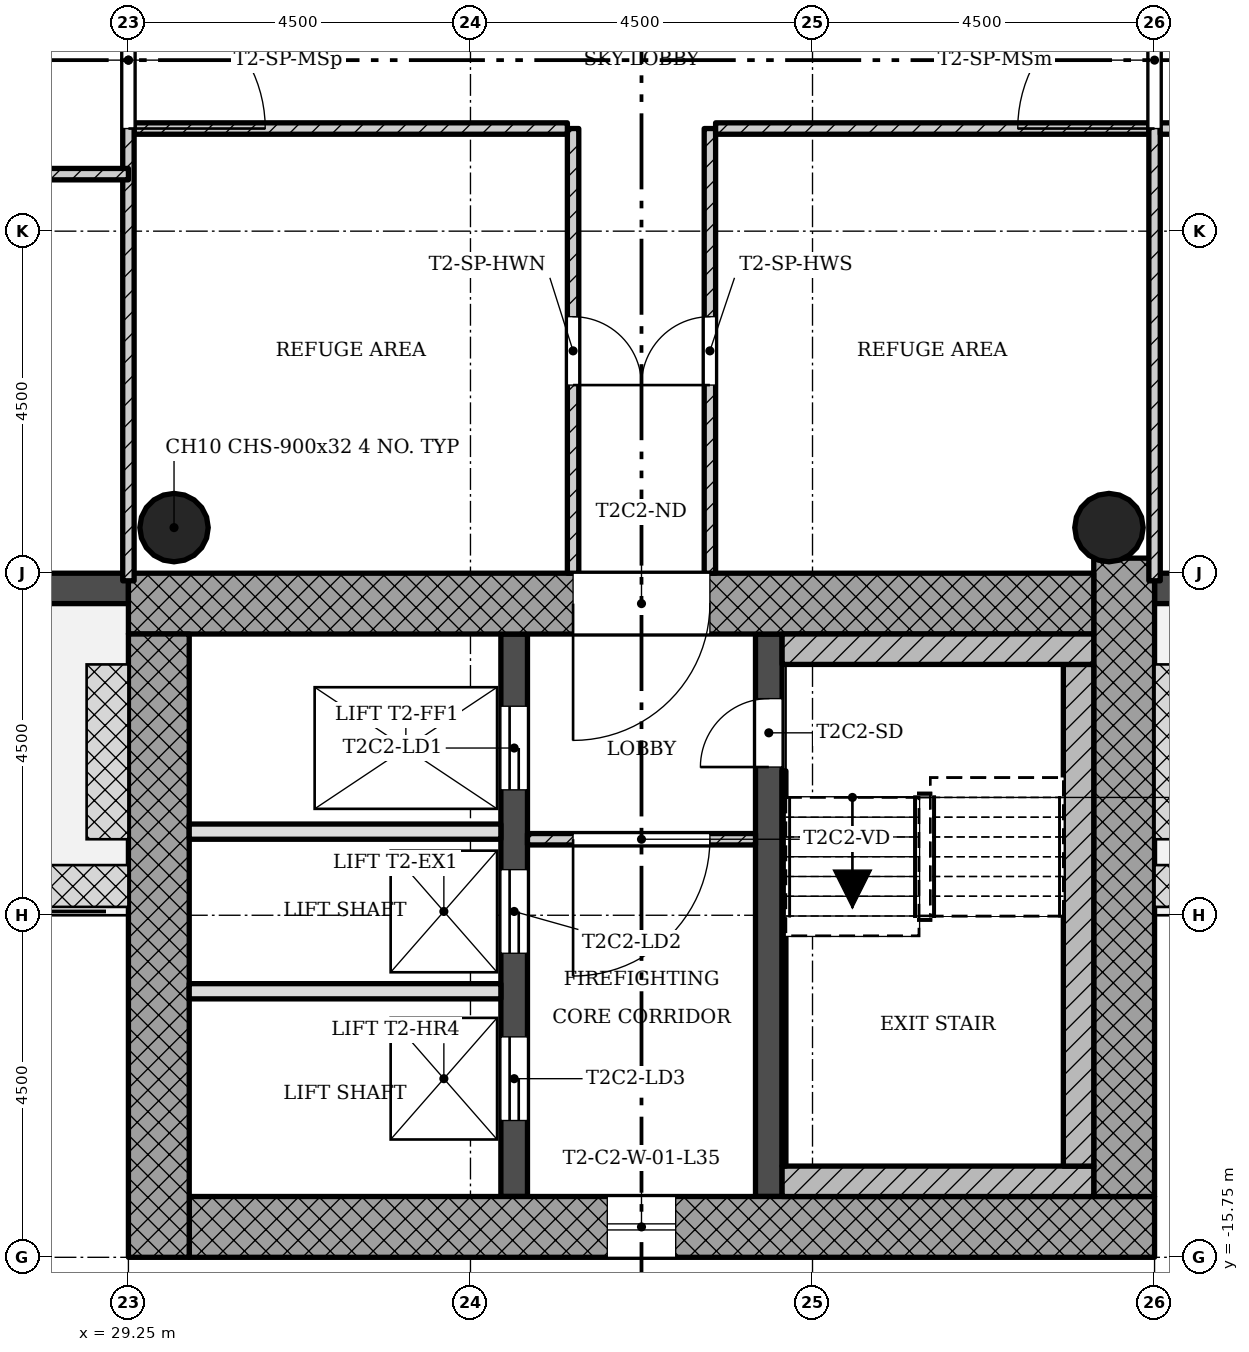
"""IFC4 building model, lengths in metres.
Left out: names, types, materials, properties, quantities, classifications, styles, units other than length and angle.
Written with IfcOpenShell. Run it as: python <this file> out.ifc"""

import sys

from ifc_helpers import new_model, si_unit, direction, frame, frame_2d, origin, origin_2d, place, context, subcontext, project, spatial, rectangle, hollow_circle, extrude, element, fill, save


model = new_model("IFC4")
c1 = context("Model", 3, precision=1e-05, world=origin(), true_north=direction((0.0, 1.0)))
c2 = subcontext(c1, "Body", "Model", "MODEL_VIEW")
j1 = project(units=[si_unit("LENGTHUNIT", "METRE"), si_unit("PLANEANGLEUNIT", "RADIAN")], contexts=[c1])
p1 = place(None, origin())
s1 = spatial("IfcSite", under=j1, at=p1, CompositionType="ELEMENT")
p2 = place(p1, origin())
s2 = spatial("IfcBuilding", under=s1, at=p2, CompositionType="ELEMENT")
p3 = place(p2, frame((0.0, 0.0, 128.7)))
s3 = spatial("IfcBuildingStorey", under=s2, at=p3, CompositionType="ELEMENT", Elevation=128.7)
p4 = place(p3, frame((30.05, -15.35, 0.0), z_axis=(0.0, 0.0, 1.0), x_axis=(1.0, 0.0, 0.0)))
e1 = element("IfcWall", 1, at=p4, inside=s3, PredefinedType="SHEAR", context=c2, shape_type="SweptSolid", body=[
    extrude(rectangle(XDim=12.7, YDim=0.8, at=frame_2d((6.35, 0.0))), origin(), (0.0, 0.0, 1.0), 5.0),
])
p5 = place(p4, frame((5.5, 0.0, 0.45)))
e2 = element("IfcOpeningElement", 2, at=p5, cuts=e1, PredefinedType="OPENING", context=c2, shape_type="SweptSolid", body=[
    extrude(rectangle(XDim=0.9, YDim=2.4, at=frame_2d((0.45, 1.2))), frame((0.0, 0.41, 0.0), z_axis=(0.0, -1.0, 0.0), x_axis=(1.0, 0.0, 0.0)), (0.0, 0.0, 1.0), 0.82),
])
p6 = place(p3, frame((42.35, -14.95, 0.0), z_axis=(0.0, 0.0, 1.0), x_axis=(0.0, 1.0, 0.0)))
e3 = element("IfcWall", 3, at=p6, inside=s3, PredefinedType="SHEAR", context=c2, shape_type="SweptSolid", body=[
    extrude(rectangle(XDim=8.398, YDim=0.8, at=frame_2d((4.199, 0.0))), origin(), (0.0, 0.0, 1.0), 5.0),
])
p7 = place(p3, frame((41.95, -7.15, 0.0), z_axis=(0.0, 0.0, 1.0), x_axis=(-1.0, 0.0, 0.0)))
e4 = element("IfcWall", 4, at=p7, inside=s3, PredefinedType="SHEAR", context=c2, shape_type="SweptSolid", body=[
    extrude(rectangle(XDim=12.7, YDim=0.8, at=frame_2d((6.35, 0.0))), origin(), (0.0, 0.0, 1.0), 5.0),
])
p8 = place(p7, frame((5.05, 0.0, 0.0)))
e5 = element("IfcOpeningElement", 5, at=p8, cuts=e4, PredefinedType="OPENING", context=c2, shape_type="SweptSolid", body=[
    extrude(rectangle(XDim=1.8, YDim=2.1, at=frame_2d((0.9, 1.05))), frame((0.0, 0.41, 0.0), z_axis=(0.0, -1.0, 0.0), x_axis=(1.0, 0.0, 0.0)), (0.0, 0.0, 1.0), 0.82),
])
p9 = place(p3, frame((29.65, -7.55, 0.0), z_axis=(0.0, 0.0, 1.0), x_axis=(0.0, -1.0, 0.0)))
e6 = element("IfcWall", 6, at=p9, inside=s3, PredefinedType="SHEAR", context=c2, shape_type="SweptSolid", body=[
    extrude(rectangle(XDim=8.2, YDim=0.8, at=frame_2d((4.1, 0.0))), origin(), (0.0, 0.0, 1.0), 5.0),
])
p10 = place(p3, frame((34.325, -14.95, 0.0), z_axis=(0.0, 0.0, 1.0), x_axis=(0.0, 1.0, 0.0)))
e7 = element("IfcWall", 7, at=p10, inside=s3, PredefinedType="SHEAR", context=c2, shape_type="SweptSolid", body=[
    extrude(rectangle(XDim=7.4, YDim=0.35, at=frame_2d((3.7, 0.0))), origin(), (0.0, 0.0, 1.0), 5.0),
])
p11 = place(p10, frame((5.35, 0.0, 0.0)))
e8 = element("IfcOpeningElement", 8, at=p11, cuts=e7, PredefinedType="OPENING", context=c2, shape_type="SweptSolid", body=[
    extrude(rectangle(XDim=1.1, YDim=2.1, at=frame_2d((0.55, 1.05))), frame((0.0, 0.185, 0.0), z_axis=(0.0, -1.0, 0.0), x_axis=(1.0, 0.0, 0.0)), (0.0, 0.0, 1.0), 0.37),
])
p12 = place(p10, frame((3.2, 0.0, 0.0)))
e9 = element("IfcOpeningElement", 9, at=p12, cuts=e7, PredefinedType="OPENING", context=c2, shape_type="SweptSolid", body=[
    extrude(rectangle(XDim=1.1, YDim=2.1, at=frame_2d((0.55, 1.05))), frame((0.0, 0.185, 0.0), z_axis=(0.0, -1.0, 0.0), x_axis=(1.0, 0.0, 0.0)), (0.0, 0.0, 1.0), 0.37),
])
p13 = place(p10, frame((1.0, 0.0, 0.0)))
e10 = element("IfcOpeningElement", 10, at=p13, cuts=e7, PredefinedType="OPENING", context=c2, shape_type="SweptSolid", body=[
    extrude(rectangle(XDim=1.1, YDim=2.1, at=frame_2d((0.55, 1.05))), frame((0.0, 0.185, 0.0), z_axis=(0.0, -1.0, 0.0), x_axis=(1.0, 0.0, 0.0)), (0.0, 0.0, 1.0), 0.37),
])
p14 = place(p3, frame((37.675, -14.95, 0.0), z_axis=(0.0, 0.0, 1.0), x_axis=(0.0, 1.0, 0.0)))
e11 = element("IfcWall", 11, at=p14, inside=s3, PredefinedType="SHEAR", context=c2, shape_type="SweptSolid", body=[
    extrude(rectangle(XDim=7.4, YDim=0.35, at=frame_2d((3.7, 0.0))), origin(), (0.0, 0.0, 1.0), 5.0),
])
p15 = place(p14, frame((5.65, 0.0, 0.0)))
e12 = element("IfcOpeningElement", 12, at=p15, cuts=e11, PredefinedType="OPENING", context=c2, shape_type="SweptSolid", body=[
    extrude(rectangle(XDim=0.9, YDim=2.1, at=frame_2d((0.45, 1.05))), frame((0.0, 0.185, 0.0), z_axis=(0.0, -1.0, 0.0), x_axis=(1.0, 0.0, 0.0)), (0.0, 0.0, 1.0), 0.37),
])
for number, where, z_axis, x_axis in (
    (13, (42.15, -6.15, 0.0), (0.0, 0.0, 1.0), (1.0, 0.0, 0.0)),
    (14, (29.85, -6.15, 0.0), (0.0, 0.0, 1.0), (1.0, 0.0, 0.0)),
):
    element("IfcColumn", number, at=place(p3, frame(where, z_axis=z_axis, x_axis=x_axis)), inside=s3, PredefinedType="COLUMN", context=c2, shape_type="SweptSolid", body=[
        extrude(hollow_circle(Radius=0.45, WallThickness=0.032, at=origin_2d()), origin(), (0.0, 0.0, 1.0), 5.0),
    ])
p16 = place(p3, frame((42.75, -6.95, -0.02), z_axis=(0.0, 0.0, 1.0), x_axis=(1.0, 0.0, 0.0)))
e15 = element("IfcWall", 15, at=p16, inside=s3, PredefinedType="STANDARD", context=c2, shape_type="SweptSolid", body=[
    extrude(rectangle(XDim=4.5, YDim=0.4, at=frame_2d((2.25, 0.0))), origin(), (0.0, 0.0, 1.0), 4.72),
])
p17 = place(p16, frame((1.35, 0.0, 0.02)))
e16 = element("IfcOpeningElement", 16, at=p17, cuts=e15, PredefinedType="OPENING", context=c2, shape_type="SweptSolid", body=[
    extrude(rectangle(XDim=1.8, YDim=2.1, at=frame_2d((0.9, 1.05))), frame((0.0, 0.21, 0.0), z_axis=(0.0, -1.0, 0.0), x_axis=(1.0, 0.0, 0.0)), (0.0, 0.0, 1.0), 0.42),
])
p18 = place(p3, frame((24.75, -6.95, -0.02), z_axis=(0.0, 0.0, 1.0), x_axis=(1.0, 0.0, 0.0)))
e17 = element("IfcWall", 17, at=p18, inside=s3, PredefinedType="STANDARD", context=c2, shape_type="SweptSolid", body=[
    extrude(rectangle(XDim=4.5, YDim=0.4, at=frame_2d((2.25, 0.0))), origin(), (0.0, 0.0, 1.0), 4.72),
])
p19 = place(p18, frame((1.35, 0.0, 0.02)))
e18 = element("IfcOpeningElement", 18, at=p19, cuts=e17, PredefinedType="OPENING", context=c2, shape_type="SweptSolid", body=[
    extrude(rectangle(XDim=1.8, YDim=2.1, at=frame_2d((0.9, 1.05))), frame((0.0, 0.21, 0.0), z_axis=(0.0, -1.0, 0.0), x_axis=(1.0, 0.0, 0.0)), (0.0, 0.0, 1.0), 0.42),
])
p20 = place(p3, frame((34.5, -10.25, 0.0), z_axis=(0.0, 0.0, 1.0), x_axis=(1.0, 0.0, 0.0)))
e19 = element("IfcWall", 19, at=p20, inside=s3, PredefinedType="PARTITIONING", context=c2, shape_type="SweptSolid", body=[
    extrude(rectangle(XDim=3.0, YDim=0.15, at=frame_2d((1.5, 0.0))), origin(), (0.0, 0.0, 1.0), 4.58),
])
p21 = place(p20, frame((0.6, 0.0, 0.0)))
e20 = element("IfcOpeningElement", 20, at=p21, cuts=e19, PredefinedType="OPENING", context=c2, shape_type="SweptSolid", body=[
    extrude(rectangle(XDim=1.8, YDim=2.1, at=frame_2d((0.9, 1.05))), frame((0.0, 0.085, 0.0), z_axis=(0.0, -1.0, 0.0), x_axis=(1.0, 0.0, 0.0)), (0.0, 0.0, 1.0), 0.17),
])
for number, where, z_axis, x_axis in (
    (21, (30.05, -10.15, 0.0), (0.0, 0.0, 1.0), (1.0, 0.0, 0.0)),
    (22, (30.05, -12.25, 0.0), (0.0, 0.0, 1.0), (1.0, 0.0, 0.0)),
):
    element("IfcWall", number, at=place(p3, frame(where, z_axis=z_axis, x_axis=x_axis)), inside=s3, PredefinedType="SOLIDWALL", context=c2, shape_type="SweptSolid", body=[
        extrude(rectangle(XDim=4.1, YDim=0.2, at=frame_2d((2.05, 0.0))), origin(), (0.0, 0.0, 1.0), 4.58),
    ])
p22 = place(p3, frame((35.1, -6.75, 0.0), z_axis=(0.0, 0.0, 1.0), x_axis=(0.0, 1.0, 0.0)))
e23 = element("IfcWall", 23, at=p22, inside=s3, PredefinedType="PARTITIONING", context=c2, shape_type="SweptSolid", body=[
    extrude(rectangle(XDim=5.85, YDim=0.15, at=frame_2d((2.925, 0.0))), origin(), (0.0, 0.0, 1.0), 4.58),
])
p23 = place(p22, frame((2.475, 0.0, 0.0)))
e24 = element("IfcOpeningElement", 24, at=p23, cuts=e23, PredefinedType="OPENING", context=c2, shape_type="SweptSolid", body=[
    extrude(rectangle(XDim=0.9, YDim=2.1, at=frame_2d((0.45, 1.05))), frame((0.0, 0.085, 0.0), z_axis=(0.0, -1.0, 0.0), x_axis=(1.0, 0.0, 0.0)), (0.0, 0.0, 1.0), 0.17),
])
p24 = place(p3, frame((35.025, -0.9, 0.0), z_axis=(0.0, 0.0, 1.0), x_axis=(-1.0, 0.0, 0.0)))
e25 = element("IfcWall", 25, at=p24, inside=s3, PredefinedType="PARTITIONING", context=c2, shape_type="SweptSolid", body=[
    extrude(rectangle(XDim=5.7, YDim=0.15, at=frame_2d((2.85, 0.0))), origin(), (0.0, 0.0, 1.0), 4.58),
])
p25 = place(p3, frame((36.9, -6.75, 0.0), z_axis=(0.0, 0.0, 1.0), x_axis=(0.0, 1.0, 0.0)))
e26 = element("IfcWall", 26, at=p25, inside=s3, PredefinedType="PARTITIONING", context=c2, shape_type="SweptSolid", body=[
    extrude(rectangle(XDim=5.85, YDim=0.15, at=frame_2d((2.925, 0.0))), origin(), (0.0, 0.0, 1.0), 4.58),
])
p26 = place(p25, frame((2.475, 0.0, 0.0)))
e27 = element("IfcOpeningElement", 27, at=p26, cuts=e26, PredefinedType="OPENING", context=c2, shape_type="SweptSolid", body=[
    extrude(rectangle(XDim=0.9, YDim=2.1, at=frame_2d((0.45, 1.05))), frame((0.0, 0.085, 0.0), z_axis=(0.0, -1.0, 0.0), x_axis=(1.0, 0.0, 0.0)), (0.0, 0.0, 1.0), 0.17),
])
p27 = place(p3, frame((42.675, -0.9, 0.0), z_axis=(0.0, 0.0, 1.0), x_axis=(-1.0, 0.0, 0.0)))
e28 = element("IfcWall", 28, at=p27, inside=s3, PredefinedType="PARTITIONING", context=c2, shape_type="SweptSolid", body=[
    extrude(rectangle(XDim=5.7, YDim=0.15, at=frame_2d((2.85, 0.0))), origin(), (0.0, 0.0, 1.0), 4.58),
])
p28 = place(p3, frame((29.25, -6.85, 0.0), z_axis=(0.0, 0.0, 1.0), x_axis=(0.0, 1.0, 0.0)))
e29 = element("IfcWall", 29, at=p28, inside=s3, PredefinedType="PARTITIONING", context=c2, shape_type="SweptSolid", body=[
    extrude(rectangle(XDim=13.7, YDim=0.15, at=frame_2d((6.85, 0.0))), origin(), (0.0, 0.0, 1.0), 4.58),
])
p29 = place(p28, frame((5.95, 0.0, 0.0)))
e30 = element("IfcOpeningElement", 30, at=p29, cuts=e29, PredefinedType="OPENING", context=c2, shape_type="SweptSolid", body=[
    extrude(rectangle(XDim=1.8, YDim=2.1, at=frame_2d((0.9, 1.05))), frame((0.0, 0.085, 0.0), z_axis=(0.0, -1.0, 0.0), x_axis=(1.0, 0.0, 0.0)), (0.0, 0.0, 1.0), 0.17),
])
p30 = place(p3, frame((29.25, -1.5, 0.0), z_axis=(0.0, 0.0, 1.0), x_axis=(-1.0, 0.0, 0.0)))
e31 = element("IfcWall", 31, at=p30, inside=s3, PredefinedType="PARTITIONING", context=c2, shape_type="SweptSolid", body=[
    extrude(rectangle(XDim=13.6, YDim=0.15, at=frame_2d((6.8, 0.0))), origin(), (0.0, 0.0, 1.0), 4.58),
])
p31 = place(p30, frame((1.8, 0.0, 0.0)))
e32 = element("IfcOpeningElement", 32, at=p31, cuts=e31, PredefinedType="OPENING", context=c2, shape_type="SweptSolid", body=[
    extrude(rectangle(XDim=0.9, YDim=2.1, at=frame_2d((0.45, 1.05))), frame((0.0, 0.085, 0.0), z_axis=(0.0, -1.0, 0.0), x_axis=(1.0, 0.0, 0.0)), (0.0, 0.0, 1.0), 0.17),
])
p32 = place(p30, frame((6.3, 0.0, 0.0)))
e33 = element("IfcOpeningElement", 33, at=p32, cuts=e31, PredefinedType="OPENING", context=c2, shape_type="SweptSolid", body=[
    extrude(rectangle(XDim=0.9, YDim=2.1, at=frame_2d((0.45, 1.05))), frame((0.0, 0.085, 0.0), z_axis=(0.0, -1.0, 0.0), x_axis=(1.0, 0.0, 0.0)), (0.0, 0.0, 1.0), 0.17),
])
p33 = place(p30, frame((10.8, 0.0, 0.0)))
e34 = element("IfcOpeningElement", 34, at=p33, cuts=e31, PredefinedType="OPENING", context=c2, shape_type="SweptSolid", body=[
    extrude(rectangle(XDim=0.9, YDim=2.1, at=frame_2d((0.45, 1.05))), frame((0.0, 0.085, 0.0), z_axis=(0.0, -1.0, 0.0), x_axis=(1.0, 0.0, 0.0)), (0.0, 0.0, 1.0), 0.17),
])
p34 = place(p3, frame((42.75, -6.85, 0.0), z_axis=(0.0, 0.0, 1.0), x_axis=(0.0, 1.0, 0.0)))
e35 = element("IfcWall", 35, at=p34, inside=s3, PredefinedType="PARTITIONING", context=c2, shape_type="SweptSolid", body=[
    extrude(rectangle(XDim=13.7, YDim=0.15, at=frame_2d((6.85, 0.0))), origin(), (0.0, 0.0, 1.0), 4.58),
])
p35 = place(p34, frame((5.95, 0.0, 0.0)))
e36 = element("IfcOpeningElement", 36, at=p35, cuts=e35, PredefinedType="OPENING", context=c2, shape_type="SweptSolid", body=[
    extrude(rectangle(XDim=1.8, YDim=2.1, at=frame_2d((0.9, 1.05))), frame((0.0, 0.085, 0.0), z_axis=(0.0, -1.0, 0.0), x_axis=(1.0, 0.0, 0.0)), (0.0, 0.0, 1.0), 0.17),
])
p36 = place(p3, frame((56.35, -0.9, 0.0), z_axis=(0.0, 0.0, 1.0), x_axis=(-1.0, 0.0, 0.0)))
e37 = element("IfcWall", 37, at=p36, inside=s3, PredefinedType="PARTITIONING", context=c2, shape_type="SweptSolid", body=[
    extrude(rectangle(XDim=13.525, YDim=0.15, at=frame_2d((6.763, 0.0))), origin(), (0.0, 0.0, 1.0), 4.58),
])
p37 = place(p36, frame((1.9, 0.0, 0.0)))
e38 = element("IfcOpeningElement", 38, at=p37, cuts=e37, PredefinedType="OPENING", context=c2, shape_type="SweptSolid", body=[
    extrude(rectangle(XDim=0.9, YDim=2.1, at=frame_2d((0.45, 1.05))), frame((0.0, 0.085, 0.0), z_axis=(0.0, -1.0, 0.0), x_axis=(1.0, 0.0, 0.0)), (0.0, 0.0, 1.0), 0.17),
])
p38 = place(p36, frame((6.4, 0.0, 0.0)))
e39 = element("IfcOpeningElement", 39, at=p38, cuts=e37, PredefinedType="OPENING", context=c2, shape_type="SweptSolid", body=[
    extrude(rectangle(XDim=0.9, YDim=2.1, at=frame_2d((0.45, 1.05))), frame((0.0, 0.085, 0.0), z_axis=(0.0, -1.0, 0.0), x_axis=(1.0, 0.0, 0.0)), (0.0, 0.0, 1.0), 0.17),
])
p39 = place(p36, frame((10.9, 0.0, 0.0)))
e40 = element("IfcOpeningElement", 40, at=p39, cuts=e37, PredefinedType="OPENING", context=c2, shape_type="SweptSolid", body=[
    extrude(rectangle(XDim=0.9, YDim=2.1, at=frame_2d((0.45, 1.05))), frame((0.0, 0.085, 0.0), z_axis=(0.0, -1.0, 0.0), x_axis=(1.0, 0.0, 0.0)), (0.0, 0.0, 1.0), 0.17),
])
p40 = place(p3, frame((37.85, -14.75, 0.0), z_axis=(0.0, 0.0, 1.0), x_axis=(1.0, 0.0, 0.0)))
e41 = element("IfcWall", 41, at=p40, inside=s3, PredefinedType="SHEAR", context=c2, shape_type="SweptSolid", body=[
    extrude(rectangle(XDim=4.1, YDim=0.4, at=frame_2d((2.05, 0.0))), origin(), (0.0, 0.0, 1.0), 5.0),
])
p41 = place(p3, frame((41.75, -7.95, 0.0), z_axis=(0.0, 0.0, 1.0), x_axis=(0.0, -1.0, 0.0)))
e42 = element("IfcWall", 42, at=p41, inside=s3, PredefinedType="SHEAR", context=c2, shape_type="SweptSolid", body=[
    extrude(rectangle(XDim=6.6, YDim=0.4, at=frame_2d((3.3, 0.0))), origin(), (0.0, 0.0, 1.0), 5.0),
])
p42 = place(p3, frame((37.85, -7.75, 0.0), z_axis=(0.0, 0.0, 1.0), x_axis=(1.0, 0.0, 0.0)))
e43 = element("IfcWall", 43, at=p42, inside=s3, PredefinedType="SHEAR", context=c2, shape_type="SweptSolid", body=[
    extrude(rectangle(XDim=4.1, YDim=0.4, at=frame_2d((2.05, 0.0))), origin(), (0.0, 0.0, 1.0), 5.0),
])
p43 = place(p3, frame((37.875, -9.35, 0.0), z_axis=(0.0, 0.0, 1.0), x_axis=(0.0, -1.0, 0.0)))
e44 = element("IfcWall", 44, at=p43, inside=s3, PredefinedType="SHEAR", context=c2, shape_type="SweptSolid", body=[
    extrude(rectangle(XDim=5.2, YDim=0.05, at=frame_2d((2.6, 0.0))), origin(), (0.0, 0.0, 1.0), 5.0),
])
p44 = place(p5, origin())
e45 = element("IfcWindow", 45, at=p44, inside=s3, PartitioningType="SINGLE_PANEL", PredefinedType="WINDOW", context=c2, shape_type="SweptSolid", body=[
    extrude(rectangle(XDim=0.9, YDim=2.4, at=frame_2d((0.45, 1.2))), frame((0.0, 0.03, 0.0), z_axis=(0.0, -1.0, 0.0), x_axis=(1.0, 0.0, 0.0)), (0.0, 0.0, 1.0), 0.06),
])
fill(e2, e45)
p45 = place(p21, origin())
e46 = element("IfcDoor", 46, at=p45, inside=s3, OperationType="SINGLE_SWING_LEFT", PredefinedType="DOOR", context=c2, shape_type="SweptSolid", body=[
    extrude(rectangle(XDim=1.8, YDim=2.1, at=frame_2d((0.9, 1.05))), frame((0.0, 0.025, 0.0), z_axis=(0.0, -1.0, 0.0), x_axis=(1.0, 0.0, 0.0)), (0.0, 0.0, 1.0), 0.05),
])
fill(e20, e46)
p46 = place(p23, origin())
e47 = element("IfcDoor", 47, at=p46, inside=s3, OperationType="SINGLE_SWING_LEFT", PredefinedType="DOOR", context=c2, shape_type="SweptSolid", body=[
    extrude(rectangle(XDim=0.9, YDim=2.1, at=frame_2d((0.45, 1.05))), frame((0.0, 0.025, 0.0), z_axis=(0.0, -1.0, 0.0), x_axis=(1.0, 0.0, 0.0)), (0.0, 0.0, 1.0), 0.05),
])
fill(e24, e47)
p47 = place(p26, origin())
e48 = element("IfcDoor", 48, at=p47, inside=s3, OperationType="SINGLE_SWING_RIGHT", PredefinedType="DOOR", context=c2, shape_type="SweptSolid", body=[
    extrude(rectangle(XDim=0.9, YDim=2.1, at=frame_2d((0.45, 1.05))), frame((0.0, 0.025, 0.0), z_axis=(0.0, -1.0, 0.0), x_axis=(1.0, 0.0, 0.0)), (0.0, 0.0, 1.0), 0.05),
])
fill(e27, e48)
p48 = place(p29, origin())
e49 = element("IfcDoor", 49, at=p48, inside=s3, OperationType="SINGLE_SWING_LEFT", PredefinedType="DOOR", context=c2, shape_type="SweptSolid", body=[
    extrude(rectangle(XDim=1.8, YDim=2.1, at=frame_2d((0.9, 1.05))), frame((0.0, 0.025, 0.0), z_axis=(0.0, -1.0, 0.0), x_axis=(1.0, 0.0, 0.0)), (0.0, 0.0, 1.0), 0.05),
])
fill(e30, e49)
p49 = place(p35, origin())
e50 = element("IfcDoor", 50, at=p49, inside=s3, OperationType="SINGLE_SWING_RIGHT", PredefinedType="DOOR", context=c2, shape_type="SweptSolid", body=[
    extrude(rectangle(XDim=1.8, YDim=2.1, at=frame_2d((0.9, 1.05))), frame((0.0, 0.025, 0.0), z_axis=(0.0, -1.0, 0.0), x_axis=(1.0, 0.0, 0.0)), (0.0, 0.0, 1.0), 0.05),
])
fill(e36, e50)
p50 = place(p15, origin())
e51 = element("IfcDoor", 51, at=p50, inside=s3, OperationType="SINGLE_SWING_RIGHT", PredefinedType="DOOR", context=c2, shape_type="SweptSolid", body=[
    extrude(rectangle(XDim=0.9, YDim=2.1, at=frame_2d((0.45, 1.05))), frame((0.0, 0.025, 0.0), z_axis=(0.0, -1.0, 0.0), x_axis=(1.0, 0.0, 0.0)), (0.0, 0.0, 1.0), 0.05),
])
fill(e12, e51)
p51 = place(p11, origin())
e52 = element("IfcDoor", 52, at=p51, inside=s3, OperationType="SLIDING_TO_LEFT", PredefinedType="DOOR", context=c2, shape_type="SweptSolid", body=[
    extrude(rectangle(XDim=1.1, YDim=2.1, at=frame_2d((0.55, 1.05))), frame((0.0, 0.025, 0.0), z_axis=(0.0, -1.0, 0.0), x_axis=(1.0, 0.0, 0.0)), (0.0, 0.0, 1.0), 0.05),
])
fill(e8, e52)
p52 = place(p12, origin())
e53 = element("IfcDoor", 53, at=p52, inside=s3, OperationType="SLIDING_TO_LEFT", PredefinedType="DOOR", context=c2, shape_type="SweptSolid", body=[
    extrude(rectangle(XDim=1.1, YDim=2.1, at=frame_2d((0.55, 1.05))), frame((0.0, 0.025, 0.0), z_axis=(0.0, -1.0, 0.0), x_axis=(1.0, 0.0, 0.0)), (0.0, 0.0, 1.0), 0.05),
])
fill(e9, e53)
p53 = place(p13, origin())
e54 = element("IfcDoor", 54, at=p53, inside=s3, OperationType="SLIDING_TO_LEFT", PredefinedType="DOOR", context=c2, shape_type="SweptSolid", body=[
    extrude(rectangle(XDim=1.1, YDim=2.1, at=frame_2d((0.55, 1.05))), frame((0.0, 0.025, 0.0), z_axis=(0.0, -1.0, 0.0), x_axis=(1.0, 0.0, 0.0)), (0.0, 0.0, 1.0), 0.05),
])
fill(e10, e54)
p54 = place(p8, origin())
e55 = element("IfcDoor", 55, at=p54, inside=s3, OperationType="SINGLE_SWING_LEFT", PredefinedType="DOOR", context=c2, shape_type="SweptSolid", body=[
    extrude(rectangle(XDim=1.8, YDim=2.1, at=frame_2d((0.9, 1.05))), frame((0.0, 0.025, 0.0), z_axis=(0.0, -1.0, 0.0), x_axis=(1.0, 0.0, 0.0)), (0.0, 0.0, 1.0), 0.05),
])
fill(e5, e55)
save(model, sys.argv[1])
